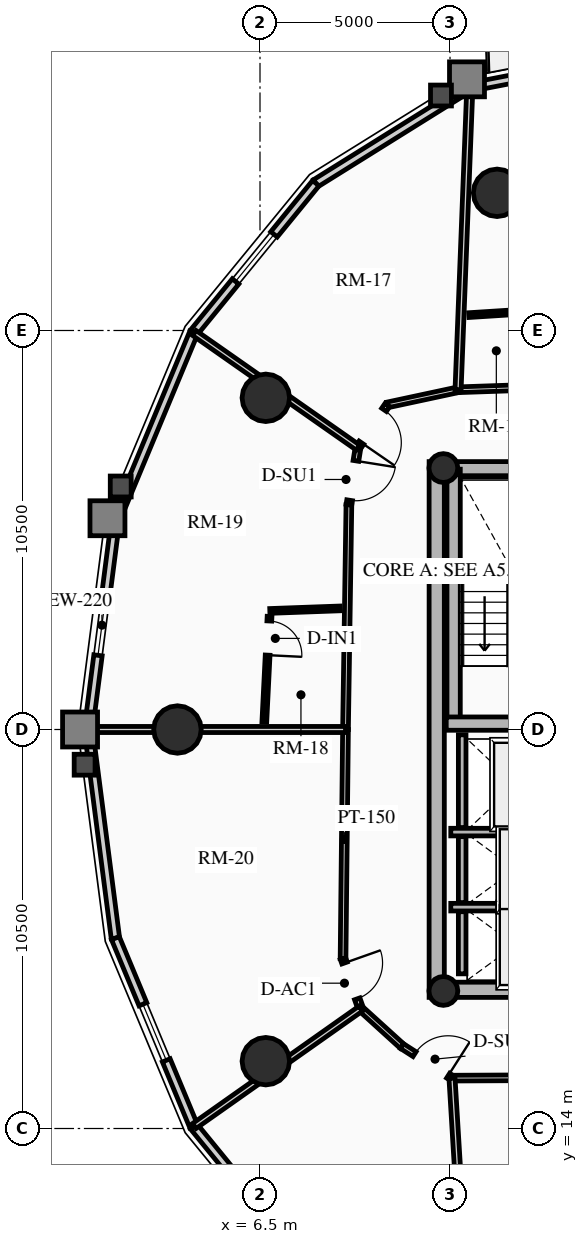
"""IFC4 building model, lengths in metres.
Left out: names, types, materials, properties, quantities, classifications, styles, units other than length and angle.
Written with IfcOpenShell. Run it as: python <this file> out.ifc"""

import sys

from ifc_helpers import new_model, si_unit, direction, frame, frame_2d, origin, origin_2d, place, context, subcontext, project, spatial, rectangle, circle, hollow_circle, extrude, source, transform, mapped, element, fill, save


model = new_model("IFC4")
c1 = context("Model", 3, precision=1e-05, world=origin(), true_north=direction((0.0, 1.0)))
c2 = subcontext(c1, "Body", "Model", "MODEL_VIEW")
j1 = project(units=[si_unit("LENGTHUNIT", "METRE"), si_unit("PLANEANGLEUNIT", "RADIAN")], contexts=[c1])
p1 = place(None, origin())
s1 = spatial("IfcSite", under=j1, at=p1, CompositionType="ELEMENT")
p2 = place(p1, origin())
s2 = spatial("IfcBuilding", under=s1, at=p2, CompositionType="ELEMENT")
p3 = place(p2, frame((0.0, 0.0, 151.6)))
s3 = spatial("IfcBuildingStorey", under=s2, at=p3, CompositionType="ELEMENT", Elevation=151.6)
p4 = place(p3, frame((11.15, 17.45, 0.0), z_axis=(0.0, 0.0, 1.0), x_axis=(0.0, 1.0, 0.0)))
e1 = element("IfcWall", 1, at=p4, inside=s3, PredefinedType="SHEAR", context=c2, shape_type="SweptSolid", body=[
    extrude(rectangle(XDim=14.1, YDim=0.4, at=frame_2d((7.05, 0.0))), origin(), (0.0, 0.0, 1.0), 2.91),
])
p5 = place(p3, frame((11.15, 17.65, 0.0), z_axis=(0.0, 0.0, 1.0), x_axis=(1.0, 0.0, 0.0)))
e2 = element("IfcWall", 2, at=p5, inside=s3, PredefinedType="SHEAR", context=c2, shape_type="SweptSolid", body=[
    extrude(rectangle(XDim=10.7, YDim=0.4, at=frame_2d((5.35, 0.0))), origin(), (0.0, 0.0, 1.0), 2.91),
])
m1 = source(origin(), c2, "Body", "SweptSolid", [
    extrude(rectangle(XDim=1.5, YDim=2.02, at=frame_2d((0.75, 1.01))), frame((0.0, 0.21, 0.0), z_axis=(0.0, -1.0, 0.0), x_axis=(1.0, 0.0, 0.0)), (0.0, 0.0, 1.0), 0.42),
])
p6 = place(p5, frame((5.45, 0.0, 0.0)))
e3 = element("IfcOpeningElement", 3, at=p6, cuts=e2, PredefinedType="OPENING", context=c2, shape_type="MappedRepresentation", body=[
    mapped(m1, transform((0.0, 0.0, 0.0), x_axis=(1.0, 0.0, 0.0), y_axis=(0.0, 1.0, 0.0), z_axis=(0.0, 0.0, 1.0), scale=1.0)),
])
p7 = place(p3, frame((11.15, 31.35, 0.0), z_axis=(0.0, 0.0, 1.0), x_axis=(1.0, 0.0, 0.0)))
e4 = element("IfcWall", 4, at=p7, inside=s3, PredefinedType="SHEAR", context=c2, shape_type="SweptSolid", body=[
    extrude(rectangle(XDim=10.7, YDim=0.4, at=frame_2d((5.35, 0.0))), origin(), (0.0, 0.0, 1.0), 2.91),
])
p8 = place(p7, frame((4.6, 0.0, 0.0)))
e5 = element("IfcOpeningElement", 5, at=p8, cuts=e4, PredefinedType="OPENING", context=c2, shape_type="MappedRepresentation", body=[
    mapped(m1, transform((0.0, 0.0, 0.0), x_axis=(1.0, 0.0, 0.0), y_axis=(0.0, 1.0, 0.0), z_axis=(0.0, 0.0, 1.0), scale=1.0)),
])
p9 = place(p3, frame((11.595, 24.655, 0.0), z_axis=(0.0, 0.0, 1.0), x_axis=(0.0, 1.0, 0.0)))
e6 = element("IfcWall", 6, at=p9, inside=s3, PredefinedType="SHEAR", context=c2, shape_type="SweptSolid", body=[
    extrude(rectangle(XDim=6.695, YDim=0.35, at=frame_2d((3.348, 0.0))), origin(), (0.0, 0.0, 1.0), 2.91),
])
p10 = place(p3, frame((11.4, 24.655, 0.0), z_axis=(0.0, 0.0, 1.0), x_axis=(1.0, 0.0, 0.0)))
e7 = element("IfcWall", 7, at=p10, inside=s3, PredefinedType="SHEAR", context=c2, shape_type="SweptSolid", body=[
    extrude(rectangle(XDim=3.285, YDim=0.35, at=frame_2d((1.643, 0.0))), origin(), (0.0, 0.0, 1.0), 2.91),
])
for number, where, z_axis, x_axis in (
    (8, (11.325, 17.62, 0.0), (0.0, 0.0, 1.0), (1.0, 0.0, 0.0)),
    (9, (11.325, 31.38, 0.0), (0.0, 0.0, 1.0), (1.0, 0.0, 0.0)),
):
    element("IfcColumn", number, at=place(p3, frame(where, z_axis=z_axis, x_axis=x_axis)), inside=s3, PredefinedType="COLUMN", context=c2, shape_type="SweptSolid", body=[
        extrude(hollow_circle(Radius=0.38, WallThickness=0.032, at=origin_2d()), origin(), (0.0, 0.0, 1.0), 2.91),
    ])
for number, where, z_axis, x_axis in (
    (10, (12.739, 38.623, 0.0), (0.0, 0.0, 1.0), (1.0, 0.0, 0.0)),
    (11, (6.653, 33.229, 0.0), (0.0, 0.0, 1.0), (1.0, 0.0, 0.0)),
    (12, (4.328, 24.5, 0.0), (0.0, 0.0, 1.0), (1.0, 0.0, 0.0)),
    (13, (6.653, 15.771, 0.0), (0.0, 0.0, 1.0), (1.0, 0.0, 0.0)),
):
    element("IfcColumn", number, at=place(p3, frame(where, z_axis=z_axis, x_axis=x_axis)), inside=s3, PredefinedType="USERDEFINED", context=c2, shape_type="SweptSolid", body=[
        extrude(circle(Radius=0.625, at=origin_2d()), origin(), (0.0, 0.0, 1.0), 2.91),
    ])
p11 = place(p3, frame((12.015, 41.4, 0.0), z_axis=(0.0, 0.0, 1.0), x_axis=(0.981718699963, 0.190337579429, 0.0)))
e14 = element("IfcWall", 14, at=p11, inside=s3, PredefinedType="SOLIDWALL", context=c2, shape_type="SweptSolid", body=[
    extrude(rectangle(XDim=4.569, YDim=0.22, at=frame_2d((2.284, 0.0))), origin(), (0.0, 0.0, 1.0), 2.245),
])
m2 = source(origin(), c2, "Body", "SweptSolid", [
    extrude(rectangle(XDim=1.15, YDim=2.005, at=frame_2d((0.575, 1.002))), frame((0.0, 0.12, 0.0), z_axis=(0.0, -1.0, 0.0), x_axis=(1.0, 0.0, 0.0)), (0.0, 0.0, 1.0), 0.24),
])
p12 = place(p11, frame((1.709, 0.0, 0.0)))
e15 = element("IfcOpeningElement", 15, at=p12, cuts=e14, PredefinedType="OPENING", context=c2, shape_type="MappedRepresentation", body=[
    mapped(m2, transform((0.0, 0.0, 0.0), x_axis=(1.0, 0.0, 0.0), y_axis=(0.0, 1.0, 0.0), z_axis=(0.0, 0.0, 1.0), scale=1.0)),
])
p13 = place(p3, frame((7.968, 38.876, 0.0), z_axis=(0.0, 0.0, 1.0), x_axis=(0.848452391194, 0.529271707044, 0.0)))
e16 = element("IfcWall", 16, at=p13, inside=s3, PredefinedType="SOLIDWALL", context=c2, shape_type="SweptSolid", body=[
    extrude(rectangle(XDim=4.769, YDim=0.22, at=frame_2d((2.385, 0.0))), origin(), (0.0, 0.0, 1.0), 2.245),
])
p14 = place(p3, frame((4.757, 34.945, 0.0), z_axis=(0.0, 0.0, 1.0), x_axis=(0.632598524901, 0.774479894053, 0.0)))
e17 = element("IfcWall", 17, at=p14, inside=s3, PredefinedType="SOLIDWALL", context=c2, shape_type="SweptSolid", body=[
    extrude(rectangle(XDim=5.076, YDim=0.22, at=frame_2d((2.538, 0.0))), origin(), (0.0, 0.0, 1.0), 2.245),
])
m3 = source(origin(), c2, "Body", "SweptSolid", [
    extrude(rectangle(XDim=1.6, YDim=1.3, at=frame_2d((0.8, 0.65))), frame((0.0, 0.12, 0.0), z_axis=(0.0, -1.0, 0.0), x_axis=(1.0, 0.0, 0.0)), (0.0, 0.0, 1.0), 0.24),
])
p15 = place(p14, frame((1.738, 0.0, 0.65)))
e18 = element("IfcOpeningElement", 18, at=p15, cuts=e17, PredefinedType="OPENING", context=c2, shape_type="MappedRepresentation", body=[
    mapped(m3, transform((0.0, 0.0, 0.0), x_axis=(1.0, 0.0, 0.0), y_axis=(0.0, 1.0, 0.0), z_axis=(0.0, 0.0, 1.0), scale=1.0)),
])
p16 = place(p3, frame((2.695, 29.991, 0.0), z_axis=(0.0, 0.0, 1.0), x_axis=(0.384259959969, 0.923224936386, 0.0)))
e19 = element("IfcWall", 19, at=p16, inside=s3, PredefinedType="SOLIDWALL", context=c2, shape_type="SweptSolid", body=[
    extrude(rectangle(XDim=5.365, YDim=0.22, at=frame_2d((2.683, 0.0))), origin(), (0.0, 0.0, 1.0), 2.245),
])
p17 = place(p3, frame((1.985, 24.5, 0.0), z_axis=(0.0, 0.0, 1.0), x_axis=(0.128266533912, 0.991739732126, 0.0)))
e20 = element("IfcWall", 20, at=p17, inside=s3, PredefinedType="SOLIDWALL", context=c2, shape_type="SweptSolid", body=[
    extrude(rectangle(XDim=5.537, YDim=0.22, at=frame_2d((2.769, 0.0))), origin(), (0.0, 0.0, 1.0), 2.245),
])
p18 = place(p17, frame((1.968, 0.0, 0.65)))
e21 = element("IfcOpeningElement", 21, at=p18, cuts=e20, PredefinedType="OPENING", context=c2, shape_type="MappedRepresentation", body=[
    mapped(m3, transform((0.0, 0.0, 0.0), x_axis=(1.0, 0.0, 0.0), y_axis=(0.0, 1.0, 0.0), z_axis=(0.0, 0.0, 1.0), scale=1.0)),
])
p19 = place(p3, frame((2.695, 19.009, 0.0), z_axis=(0.0, 0.0, 1.0), x_axis=(-0.128266533912, 0.991739732126, 0.0)))
e22 = element("IfcWall", 22, at=p19, inside=s3, PredefinedType="SOLIDWALL", context=c2, shape_type="SweptSolid", body=[
    extrude(rectangle(XDim=5.537, YDim=0.22, at=frame_2d((2.769, 0.0))), origin(), (0.0, 0.0, 1.0), 2.245),
])
p20 = place(p3, frame((4.757, 14.055, 0.0), z_axis=(0.0, 0.0, 1.0), x_axis=(-0.384259959969, 0.923224936386, 0.0)))
e23 = element("IfcWall", 23, at=p20, inside=s3, PredefinedType="SOLIDWALL", context=c2, shape_type="SweptSolid", body=[
    extrude(rectangle(XDim=5.365, YDim=0.22, at=frame_2d((2.683, 0.0))), origin(), (0.0, 0.0, 1.0), 2.245),
])
p21 = place(p20, frame((1.883, 0.0, 0.65)))
e24 = element("IfcOpeningElement", 24, at=p21, cuts=e23, PredefinedType="OPENING", context=c2, shape_type="MappedRepresentation", body=[
    mapped(m3, transform((0.0, 0.0, 0.0), x_axis=(1.0, 0.0, 0.0), y_axis=(0.0, 1.0, 0.0), z_axis=(0.0, 0.0, 1.0), scale=1.0)),
])
p22 = place(p3, frame((7.968, 10.124, 0.0), z_axis=(0.0, 0.0, 1.0), x_axis=(-0.632598524901, 0.774479894053, 0.0)))
e25 = element("IfcWall", 25, at=p22, inside=s3, PredefinedType="SOLIDWALL", context=c2, shape_type="SweptSolid", body=[
    extrude(rectangle(XDim=5.076, YDim=0.22, at=frame_2d((2.538, 0.0))), origin(), (0.0, 0.0, 1.0), 2.245),
])
p23 = place(p3, frame((11.52, 21.8, 0.0), z_axis=(0.0, 0.0, 1.0), x_axis=(1.0, 0.0, 0.0)))
e26 = element("IfcWall", 26, at=p23, inside=s3, PredefinedType="SHEAR", context=c2, shape_type="SweptSolid", body=[
    extrude(rectangle(XDim=2.97, YDim=0.2, at=frame_2d((1.485, 0.0))), origin(), (0.0, 0.0, 1.0), 2.91),
])
p24 = place(p3, frame((11.82, 21.92, 0.0), z_axis=(0.0, 0.0, 1.0), x_axis=(0.0, 1.0, 0.0)))
e27 = element("IfcWall", 27, at=p24, inside=s3, PredefinedType="SHEAR", context=c2, shape_type="SweptSolid", body=[
    extrude(rectangle(XDim=2.44, YDim=0.2, at=frame_2d((1.22, 0.0))), origin(), (0.0, 0.0, 1.0), 2.91),
])
p25 = place(p3, frame((11.52, 19.825, 0.0), z_axis=(0.0, 0.0, 1.0), x_axis=(1.0, 0.0, 0.0)))
e28 = element("IfcWall", 28, at=p25, inside=s3, PredefinedType="SHEAR", context=c2, shape_type="SweptSolid", body=[
    extrude(rectangle(XDim=2.97, YDim=0.2, at=frame_2d((1.485, 0.0))), origin(), (0.0, 0.0, 1.0), 2.91),
])
p26 = place(p3, frame((11.82, 19.945, 0.0), z_axis=(0.0, 0.0, 1.0), x_axis=(0.0, 1.0, 0.0)))
e29 = element("IfcWall", 29, at=p26, inside=s3, PredefinedType="SHEAR", context=c2, shape_type="SweptSolid", body=[
    extrude(rectangle(XDim=1.735, YDim=0.2, at=frame_2d((0.867, 0.0))), origin(), (0.0, 0.0, 1.0), 2.91),
])
p27 = place(p3, frame((11.82, 18.07, 0.0), z_axis=(0.0, 0.0, 1.0), x_axis=(0.0, 1.0, 0.0)))
e30 = element("IfcWall", 30, at=p27, inside=s3, PredefinedType="SHEAR", context=c2, shape_type="SweptSolid", body=[
    extrude(rectangle(XDim=1.635, YDim=0.2, at=frame_2d((0.817, 0.0))), origin(), (0.0, 0.0, 1.0), 2.91),
])
p28 = place(p3, frame((18.112, 33.659, 0.0), z_axis=(0.0, 0.0, 1.0), x_axis=(-0.999413895918, -0.034232508622, 0.0)))
e31 = element("IfcWall", 31, at=p28, inside=s3, PredefinedType="PARTITIONING", context=c2, shape_type="SweptSolid", body=[
    extrude(rectangle(XDim=6.404, YDim=0.15, at=frame_2d((3.202, 0.0))), origin(), (0.0, 0.0, 1.0), 2.245),
])
p29 = place(p3, frame((11.712, 33.44, 0.0), z_axis=(0.0, 0.0, 1.0), x_axis=(-0.977753514213, -0.209757158265, 0.0)))
e32 = element("IfcWall", 32, at=p29, inside=s3, PredefinedType="PARTITIONING", context=c2, shape_type="SweptSolid", body=[
    extrude(rectangle(XDim=1.901, YDim=0.15, at=frame_2d((0.95, 0.0))), origin(), (0.0, 0.0, 1.0), 2.245),
])
p30 = place(p3, frame((9.853, 33.042, 0.0), z_axis=(0.0, 0.0, 1.0), x_axis=(-0.567189283521, -0.823587467522, 0.0)))
e33 = element("IfcWall", 33, at=p30, inside=s3, PredefinedType="PARTITIONING", context=c2, shape_type="SweptSolid", body=[
    extrude(rectangle(XDim=1.365, YDim=0.15, at=frame_2d((0.682, 0.0))), origin(), (0.0, 0.0, 1.0), 2.245),
])
m4 = source(origin(), c2, "Body", "SweptSolid", [
    extrude(rectangle(XDim=1.05, YDim=2.015, at=frame_2d((0.525, 1.007))), frame((0.0, 0.085, 0.0), z_axis=(0.0, -1.0, 0.0), x_axis=(1.0, 0.0, 0.0)), (0.0, 0.0, 1.0), 0.17),
])
p31 = place(p30, frame((0.157, 0.0, 0.0)))
e34 = element("IfcOpeningElement", 34, at=p31, cuts=e33, PredefinedType="OPENING", context=c2, shape_type="MappedRepresentation", body=[
    mapped(m4, transform((0.0, 0.0, 0.0), x_axis=(1.0, 0.0, 0.0), y_axis=(0.0, 1.0, 0.0), z_axis=(0.0, 0.0, 1.0), scale=1.0)),
])
p32 = place(p3, frame((9.079, 31.918, 0.0), z_axis=(0.0, 0.0, 1.0), x_axis=(-0.15742775293, -0.987530507178, 0.0)))
e35 = element("IfcWall", 35, at=p32, inside=s3, PredefinedType="PARTITIONING", context=c2, shape_type="SweptSolid", body=[
    extrude(rectangle(XDim=1.523, YDim=0.15, at=frame_2d((0.761, 0.0))), origin(), (0.0, 0.0, 1.0), 2.245),
])
p33 = place(p32, frame((0.353, 0.0, 0.0)))
e36 = element("IfcOpeningElement", 36, at=p33, cuts=e35, PredefinedType="OPENING", context=c2, shape_type="MappedRepresentation", body=[
    mapped(m4, transform((0.0, 0.0, 0.0), x_axis=(1.0, 0.0, 0.0), y_axis=(0.0, 1.0, 0.0), z_axis=(0.0, 0.0, 1.0), scale=1.0)),
])
p34 = place(p3, frame((8.84, 30.414, 0.0), z_axis=(0.0, 0.0, 1.0), x_axis=(-0.01514915101, -0.999885245027, 0.0)))
e37 = element("IfcWall", 37, at=p34, inside=s3, PredefinedType="PARTITIONING", context=c2, shape_type="SweptSolid", body=[
    extrude(rectangle(XDim=5.915, YDim=0.15, at=frame_2d((2.957, 0.0))), origin(), (0.0, 0.0, 1.0), 2.675),
])
p35 = place(p3, frame((8.75, 24.5, 0.0), z_axis=(0.0, 0.0, 1.0), x_axis=(-0.01076642715, -0.999942040344, 0.0)))
e38 = element("IfcWall", 38, at=p35, inside=s3, PredefinedType="PARTITIONING", context=c2, shape_type="SweptSolid", body=[
    extrude(rectangle(XDim=6.032, YDim=0.15, at=frame_2d((3.016, 0.0))), origin(), (0.0, 0.0, 1.0), 2.245),
])
p36 = place(p3, frame((8.685, 18.469, 0.0), z_axis=(0.0, 0.0, 1.0), x_axis=(0.333415749461, -0.942779899028, 0.0)))
e39 = element("IfcWall", 39, at=p36, inside=s3, PredefinedType="PARTITIONING", context=c2, shape_type="SweptSolid", body=[
    extrude(rectangle(XDim=1.394, YDim=0.15, at=frame_2d((0.697, 0.0))), origin(), (0.0, 0.0, 1.0), 2.245),
])
m5 = source(origin(), c2, "Body", "SweptSolid", [
    extrude(rectangle(XDim=1.0, YDim=2.015, at=frame_2d((0.5, 1.007))), frame((0.0, 0.085, 0.0), z_axis=(0.0, -1.0, 0.0), x_axis=(1.0, 0.0, 0.0)), (0.0, 0.0, 1.0), 0.17),
])
p37 = place(p36, frame((0.12, 0.0, 0.0)))
e40 = element("IfcOpeningElement", 40, at=p37, cuts=e39, PredefinedType="OPENING", context=c2, shape_type="MappedRepresentation", body=[
    mapped(m5, transform((0.0, 0.0, 0.0), x_axis=(1.0, 0.0, 0.0), y_axis=(0.0, 1.0, 0.0), z_axis=(0.0, 0.0, 1.0), scale=1.0)),
])
p38 = place(p3, frame((9.15, 17.155, 0.0), z_axis=(0.0, 0.0, 1.0), x_axis=(0.740451494731, -0.672109800517, 0.0)))
e41 = element("IfcWall", 41, at=p38, inside=s3, PredefinedType="PARTITIONING", context=c2, shape_type="SweptSolid", body=[
    extrude(rectangle(XDim=1.468, YDim=0.15, at=frame_2d((0.734, 0.0))), origin(), (0.0, 0.0, 1.0), 2.245),
])
p39 = place(p3, frame((10.237, 16.168, 0.0), z_axis=(0.0, 0.0, 1.0), x_axis=(0.842061223587, -0.53938195718, 0.0)))
e42 = element("IfcWall", 42, at=p39, inside=s3, PredefinedType="PARTITIONING", context=c2, shape_type="SweptSolid", body=[
    extrude(rectangle(XDim=1.562, YDim=0.15, at=frame_2d((0.781, 0.0))), origin(), (0.0, 0.0, 1.0), 2.245),
])
p40 = place(p39, frame((0.392, 0.0, 0.0)))
e43 = element("IfcOpeningElement", 43, at=p40, cuts=e42, PredefinedType="OPENING", context=c2, shape_type="MappedRepresentation", body=[
    mapped(m4, transform((0.0, 0.0, 0.0), x_axis=(1.0, 0.0, 0.0), y_axis=(0.0, 1.0, 0.0), z_axis=(0.0, 0.0, 1.0), scale=1.0)),
])
p41 = place(p3, frame((11.552, 15.326, 0.0), z_axis=(0.0, 0.0, 1.0), x_axis=(0.999989573465, 0.004566504266, 0.0)))
e44 = element("IfcWall", 44, at=p41, inside=s3, PredefinedType="PARTITIONING", context=c2, shape_type="SweptSolid", body=[
    extrude(rectangle(XDim=3.261, YDim=0.15, at=frame_2d((1.631, 0.0))), origin(), (0.0, 0.0, 1.0), 2.245),
])
p42 = place(p3, frame((11.712, 33.44, 0.0), z_axis=(0.0, 0.0, 1.0), x_axis=(0.038892064024, 0.999243417469, 0.0)))
e45 = element("IfcWall", 45, at=p42, inside=s3, PredefinedType="PARTITIONING", context=c2, shape_type="SweptSolid", body=[
    extrude(rectangle(XDim=7.947, YDim=0.16, at=frame_2d((3.974, 0.0))), origin(), (0.0, 0.0, 1.0), 2.245),
])
p43 = place(p3, frame((9.079, 31.918, 0.0), z_axis=(0.0, 0.0, 1.0), x_axis=(-0.819135909075, 0.573599479135, 0.0)))
e46 = element("IfcWall", 46, at=p43, inside=s3, PredefinedType="PARTITIONING", context=c2, shape_type="SweptSolid", body=[
    extrude(rectangle(XDim=5.257, YDim=0.16, at=frame_2d((2.628, 0.0))), origin(), (0.0, 0.0, 1.0), 2.245),
])
p44 = place(p3, frame((8.75, 24.5, 0.0), z_axis=(0.0, 0.0, 1.0), x_axis=(-1.0, 0.0, 0.0)))
e47 = element("IfcWall", 47, at=p44, inside=s3, PredefinedType="PARTITIONING", context=c2, shape_type="SweptSolid", body=[
    extrude(rectangle(XDim=6.745, YDim=0.16, at=frame_2d((3.373, 0.0))), origin(), (0.0, 0.0, 1.0), 2.245),
])
p45 = place(p3, frame((9.15, 17.155, 0.0), z_axis=(0.0, 0.0, 1.0), x_axis=(-0.81708911443, -0.576511386774, 0.0)))
e48 = element("IfcWall", 48, at=p45, inside=s3, PredefinedType="PARTITIONING", context=c2, shape_type="SweptSolid", body=[
    extrude(rectangle(XDim=5.356, YDim=0.16, at=frame_2d((2.678, 0.0))), origin(), (0.0, 0.0, 1.0), 2.245),
])
p46 = place(p3, frame((11.552, 15.326, 0.0), z_axis=(0.0, 0.0, 1.0), x_axis=(0.060740403573, -0.998153597085, 0.0)))
e49 = element("IfcWall", 49, at=p46, inside=s3, PredefinedType="PARTITIONING", context=c2, shape_type="SweptSolid", body=[
    extrude(rectangle(XDim=7.721, YDim=0.16, at=frame_2d((3.861, 0.0))), origin(), (0.0, 0.0, 1.0), 2.245),
])
p47 = place(p3, frame((14.841, 35.586, 0.0), z_axis=(0.0, 0.0, 1.0), x_axis=(-0.997963636416, -0.063785424599, 0.0)))
e50 = element("IfcWall", 50, at=p47, inside=s3, PredefinedType="PARTITIONING", context=c2, shape_type="SweptSolid", body=[
    extrude(rectangle(XDim=2.852, YDim=0.125, at=frame_2d((1.426, 0.0))), origin(), (0.0, 0.0, 1.0), 2.245),
])
m6 = source(origin(), c2, "Body", "SweptSolid", [
    extrude(rectangle(XDim=0.9, YDim=2.005, at=frame_2d((0.45, 1.002))), frame((0.0, 0.073, 0.0), z_axis=(0.0, -1.0, 0.0), x_axis=(1.0, 0.0, 0.0)), (0.0, 0.0, 1.0), 0.145),
])
p48 = place(p47, frame((0.12, 0.0, 0.0)))
e51 = element("IfcOpeningElement", 51, at=p48, cuts=e50, PredefinedType="OPENING", context=c2, shape_type="MappedRepresentation", body=[
    mapped(m6, transform((0.0, 0.0, 0.0), x_axis=(1.0, 0.0, 0.0), y_axis=(0.0, 1.0, 0.0), z_axis=(0.0, 0.0, 1.0), scale=1.0)),
])
p49 = place(p3, frame((8.606, 27.687, 0.0), z_axis=(0.0, 0.0, 1.0), x_axis=(-0.999349834195, -0.036054249337, 0.0)))
e52 = element("IfcWall", 52, at=p49, inside=s3, PredefinedType="PARTITIONING", context=c2, shape_type="SweptSolid", body=[
    extrude(rectangle(XDim=1.849, YDim=0.125, at=frame_2d((0.924, 0.0))), origin(), (0.0, 0.0, 1.0), 2.675),
])
p50 = place(p3, frame((6.751, 27.475, 0.0), z_axis=(0.0, 0.0, 1.0), x_axis=(-0.049591166042, -0.998769601185, 0.0)))
e53 = element("IfcWall", 53, at=p50, inside=s3, PredefinedType="PARTITIONING", context=c2, shape_type="SweptSolid", body=[
    extrude(rectangle(XDim=2.777, YDim=0.125, at=frame_2d((1.388, 0.0))), origin(), (0.0, 0.0, 1.0), 2.675),
])
p51 = place(p50, frame((0.12, 0.0, 0.0)))
e54 = element("IfcOpeningElement", 54, at=p51, cuts=e53, PredefinedType="OPENING", context=c2, shape_type="MappedRepresentation", body=[
    mapped(m6, transform((0.0, 0.0, 0.0), x_axis=(1.0, 0.0, 0.0), y_axis=(0.0, 1.0, 0.0), z_axis=(0.0, 0.0, 1.0), scale=1.0)),
])
m7 = source(origin(), c2, "Body", "SweptSolid", [
    extrude(rectangle(XDim=1.6, YDim=1.3, at=frame_2d((0.8, 0.65))), frame((0.0, 0.03, 0.0), z_axis=(0.0, -1.0, 0.0), x_axis=(1.0, 0.0, 0.0)), (0.0, 0.0, 1.0), 0.06),
])
p52 = place(p15, origin())
e55 = element("IfcWindow", 55, at=p52, inside=s3, PartitioningType="SINGLE_PANEL", PredefinedType="WINDOW", context=c2, shape_type="MappedRepresentation", body=[
    mapped(m7, transform((0.0, 0.0, 0.0), x_axis=(1.0, 0.0, 0.0), y_axis=(0.0, 1.0, 0.0), z_axis=(0.0, 0.0, 1.0), scale=1.0)),
])
fill(e18, e55)
p53 = place(p18, origin())
e56 = element("IfcWindow", 56, at=p53, inside=s3, PartitioningType="SINGLE_PANEL", PredefinedType="WINDOW", context=c2, shape_type="MappedRepresentation", body=[
    mapped(m7, transform((0.0, 0.0, 0.0), x_axis=(1.0, 0.0, 0.0), y_axis=(0.0, 1.0, 0.0), z_axis=(0.0, 0.0, 1.0), scale=1.0)),
])
fill(e21, e56)
p54 = place(p21, origin())
e57 = element("IfcWindow", 57, at=p54, inside=s3, PartitioningType="SINGLE_PANEL", PredefinedType="WINDOW", context=c2, shape_type="MappedRepresentation", body=[
    mapped(m7, transform((0.0, 0.0, 0.0), x_axis=(1.0, 0.0, 0.0), y_axis=(0.0, 1.0, 0.0), z_axis=(0.0, 0.0, 1.0), scale=1.0)),
])
fill(e24, e57)
m8 = source(origin(), c2, "Body", "SweptSolid", [
    extrude(rectangle(XDim=1.05, YDim=2.015, at=frame_2d((0.525, 1.007))), frame((0.0, 0.025, 0.0), z_axis=(0.0, -1.0, 0.0), x_axis=(1.0, 0.0, 0.0)), (0.0, 0.0, 1.0), 0.05),
])
p55 = place(p31, origin())
e58 = element("IfcDoor", 58, at=p55, inside=s3, OperationType="SINGLE_SWING_RIGHT", PredefinedType="DOOR", context=c2, shape_type="MappedRepresentation", body=[
    mapped(m8, transform((0.0, 0.0, 0.0), x_axis=(1.0, 0.0, 0.0), y_axis=(0.0, 1.0, 0.0), z_axis=(0.0, 0.0, 1.0), scale=1.0)),
])
fill(e34, e58)
p56 = place(p33, origin())
e59 = element("IfcDoor", 59, at=p56, inside=s3, OperationType="SINGLE_SWING_LEFT", PredefinedType="DOOR", context=c2, shape_type="MappedRepresentation", body=[
    mapped(m8, transform((0.0, 0.0, 0.0), x_axis=(1.0, 0.0, 0.0), y_axis=(0.0, 1.0, 0.0), z_axis=(0.0, 0.0, 1.0), scale=1.0)),
])
fill(e36, e59)
m9 = source(origin(), c2, "Body", "SweptSolid", [
    extrude(rectangle(XDim=0.9, YDim=2.005, at=frame_2d((0.45, 1.002))), frame((0.0, 0.025, 0.0), z_axis=(0.0, -1.0, 0.0), x_axis=(1.0, 0.0, 0.0)), (0.0, 0.0, 1.0), 0.05),
])
p57 = place(p51, origin())
e60 = element("IfcDoor", 60, at=p57, inside=s3, OperationType="SINGLE_SWING_RIGHT", PredefinedType="DOOR", context=c2, shape_type="MappedRepresentation", body=[
    mapped(m9, transform((0.0, 0.0, 0.0), x_axis=(1.0, 0.0, 0.0), y_axis=(0.0, 1.0, 0.0), z_axis=(0.0, 0.0, 1.0), scale=1.0)),
])
fill(e54, e60)
m10 = source(origin(), c2, "Body", "SweptSolid", [
    extrude(rectangle(XDim=1.0, YDim=2.015, at=frame_2d((0.5, 1.007))), frame((0.0, 0.025, 0.0), z_axis=(0.0, -1.0, 0.0), x_axis=(1.0, 0.0, 0.0)), (0.0, 0.0, 1.0), 0.05),
])
p58 = place(p37, origin())
e61 = element("IfcDoor", 61, at=p58, inside=s3, OperationType="SINGLE_SWING_LEFT", PredefinedType="DOOR", context=c2, shape_type="MappedRepresentation", body=[
    mapped(m10, transform((0.0, 0.0, 0.0), x_axis=(1.0, 0.0, 0.0), y_axis=(0.0, 1.0, 0.0), z_axis=(0.0, 0.0, 1.0), scale=1.0)),
])
fill(e40, e61)
p59 = place(p40, origin())
e62 = element("IfcDoor", 62, at=p59, inside=s3, OperationType="SINGLE_SWING_RIGHT", PredefinedType="DOOR", context=c2, shape_type="MappedRepresentation", body=[
    mapped(m8, transform((0.0, 0.0, 0.0), x_axis=(1.0, 0.0, 0.0), y_axis=(0.0, 1.0, 0.0), z_axis=(0.0, 0.0, 1.0), scale=1.0)),
])
fill(e43, e62)
save(model, sys.argv[1])
